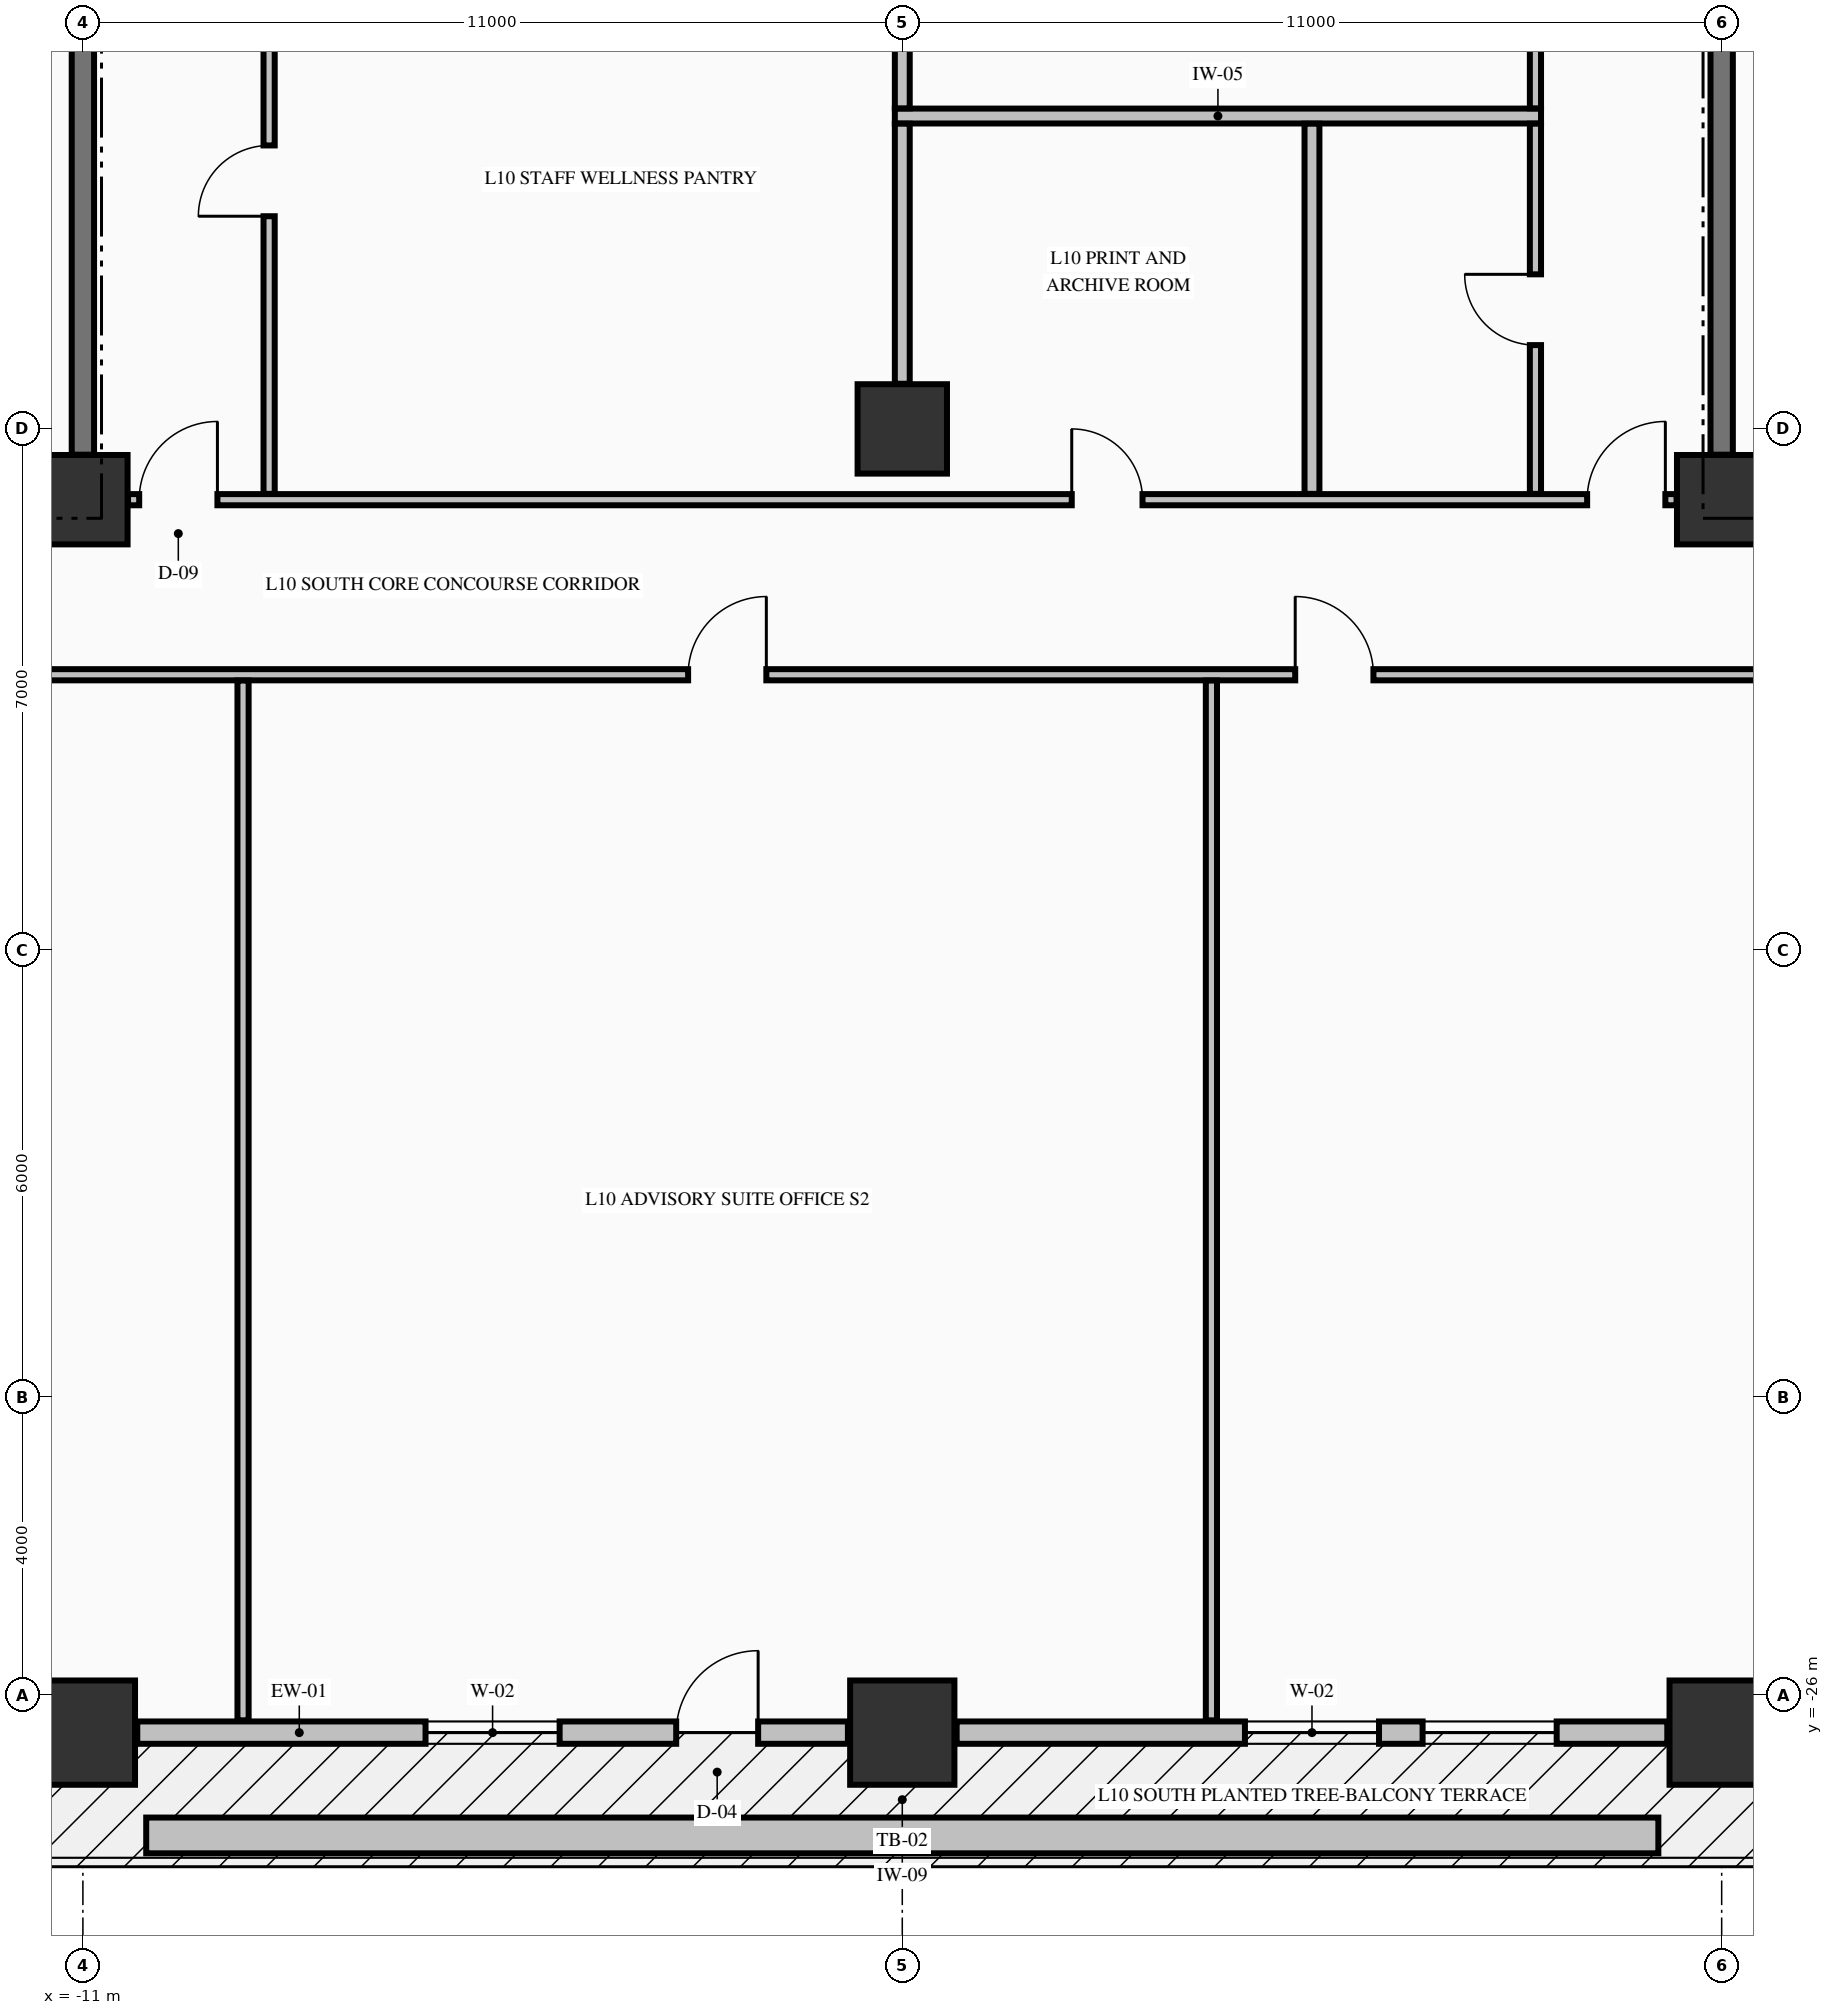
"""IFC4 building model, lengths in metres.
Left out: names, types, materials, properties, quantities, classifications, styles, units other than length and angle.
Written with IfcOpenShell. Run it as: python <this file> out.ifc"""

import sys

from ifc_helpers import new_model, si_unit, direction, frame, frame_2d, origin, origin_2d, place, context, subcontext, project, spatial, rectangle, extrude, element, fill, save


model = new_model("IFC4")
c1 = context("Model", 3, precision=1e-05, world=origin(), true_north=direction((0.0, 1.0)))
c2 = subcontext(c1, "Body", "Model", "MODEL_VIEW")
j1 = project(units=[si_unit("LENGTHUNIT", "METRE"), si_unit("PLANEANGLEUNIT", "RADIAN")], contexts=[c1])
p1 = place(None, origin())
s1 = spatial("IfcSite", under=j1, at=p1, CompositionType="ELEMENT")
p2 = place(p1, origin())
s2 = spatial("IfcBuilding", under=s1, at=p2, CompositionType="ELEMENT")
p3 = place(p2, frame((0.0, 0.0, 45.05)))
s3 = spatial("IfcBuildingStorey", under=s2, at=p3, CompositionType="ELEMENT", Elevation=45.05)
for number, where, z_axis, x_axis in (
    (1, (-11.0, -26.5, -0.25), (0.0, 0.0, 1.0), (1.0, 0.0, 0.0)),
    (2, (0.0, -26.5, -0.25), (0.0, 0.0, 1.0), (1.0, 0.0, 0.0)),
    (3, (11.0, -26.5, -0.25), (0.0, 0.0, 1.0), (1.0, 0.0, 0.0)),
):
    element("IfcColumn", number, at=place(p3, frame(where, z_axis=z_axis, x_axis=x_axis)), inside=s3, PredefinedType="COLUMN", context=c2, shape_type="SweptSolid", body=[
        extrude(rectangle(XDim=1.4, YDim=1.4, at=origin_2d()), origin(), (0.0, 0.0, 1.0), 3.57),
    ])
for number, where, z_axis, x_axis in (
    (4, (-11.0, -9.95, -0.25), (0.0, 0.0, 1.0), (1.0, 0.0, 0.0)),
    (5, (11.0, -9.95, -0.25), (0.0, 0.0, 1.0), (1.0, 0.0, 0.0)),
    (6, (0.0, -9.0, -0.25), (0.0, 0.0, 1.0), (1.0, 0.0, 0.0)),
):
    element("IfcColumn", number, at=place(p3, frame(where, z_axis=z_axis, x_axis=x_axis)), inside=s3, PredefinedType="COLUMN", context=c2, shape_type="SweptSolid", body=[
        extrude(rectangle(XDim=1.2, YDim=1.2, at=origin_2d()), origin(), (0.0, 0.0, 1.0), 3.57),
    ])
p4 = place(p3, frame((-10.27, -26.5, 0.0), z_axis=(0.0, 0.0, 1.0), x_axis=(1.0, 0.0, 0.0)))
e7 = element("IfcWall", 7, at=p4, inside=s3, PredefinedType="STANDARD", context=c2, shape_type="SweptSolid", body=[
    extrude(rectangle(XDim=9.54, YDim=0.3, at=frame_2d((4.77, 0.0))), origin(), (0.0, 0.0, 1.0), 2.712),
])
p5 = place(p4, frame((7.235, 0.0, 0.0)))
e8 = element("IfcOpeningElement", 8, at=p5, cuts=e7, PredefinedType="OPENING", context=c2, shape_type="SweptSolid", body=[
    extrude(rectangle(XDim=1.1, YDim=2.15, at=frame_2d((0.55, 1.075))), frame((0.0, 0.16, 0.0), z_axis=(0.0, -1.0, 0.0), x_axis=(1.0, 0.0, 0.0)), (0.0, 0.0, 1.0), 0.32),
])
p6 = place(p4, frame((3.87, 0.0, 0.78)))
e9 = element("IfcOpeningElement", 9, at=p6, cuts=e7, PredefinedType="OPENING", context=c2, shape_type="SweptSolid", body=[
    extrude(rectangle(XDim=1.8, YDim=1.72, at=frame_2d((0.9, 0.86))), frame((0.0, 0.16, 0.0), z_axis=(0.0, -1.0, 0.0), x_axis=(1.0, 0.0, 0.0)), (0.0, 0.0, 1.0), 0.32),
])
p7 = place(p3, frame((0.73, -26.5, 0.0), z_axis=(0.0, 0.0, 1.0), x_axis=(1.0, 0.0, 0.0)))
e10 = element("IfcWall", 10, at=p7, inside=s3, PredefinedType="STANDARD", context=c2, shape_type="SweptSolid", body=[
    extrude(rectangle(XDim=9.54, YDim=0.3, at=frame_2d((4.77, 0.0))), origin(), (0.0, 0.0, 1.0), 2.712),
])
p8 = place(p7, frame((3.87, 0.0, 0.78)))
e11 = element("IfcOpeningElement", 11, at=p8, cuts=e10, PredefinedType="OPENING", context=c2, shape_type="SweptSolid", body=[
    extrude(rectangle(XDim=1.8, YDim=1.72, at=frame_2d((0.9, 0.86))), frame((0.0, 0.16, 0.0), z_axis=(0.0, -1.0, 0.0), x_axis=(1.0, 0.0, 0.0)), (0.0, 0.0, 1.0), 0.32),
])
p9 = place(p7, frame((6.255, 0.0, 0.78)))
e12 = element("IfcOpeningElement", 12, at=p9, cuts=e10, PredefinedType="OPENING", context=c2, shape_type="SweptSolid", body=[
    extrude(rectangle(XDim=1.8, YDim=1.72, at=frame_2d((0.9, 0.86))), frame((0.0, 0.16, 0.0), z_axis=(0.0, -1.0, 0.0), x_axis=(1.0, 0.0, 0.0)), (0.0, 0.0, 1.0), 0.32),
])
p10 = place(p3, frame((-23.835, -12.3, 0.0), z_axis=(0.0, 0.0, 1.0), x_axis=(1.0, 0.0, 0.0)))
e13 = element("IfcWall", 13, at=p10, inside=s3, PredefinedType="PARTITIONING", context=c2, shape_type="SweptSolid", body=[
    extrude(rectangle(XDim=52.67, YDim=0.15, at=frame_2d((26.335, 0.0))), origin(), (0.0, 0.0, 1.0), 3.32),
])
p11 = place(p10, frame((8.99, 0.0, 0.0)))
e14 = element("IfcOpeningElement", 14, at=p11, cuts=e13, PredefinedType="OPENING", context=c2, shape_type="SweptSolid", body=[
    extrude(rectangle(XDim=1.05, YDim=2.15, at=frame_2d((0.525, 1.075))), frame((0.0, 0.085, 0.0), z_axis=(0.0, -1.0, 0.0), x_axis=(1.0, 0.0, 0.0)), (0.0, 0.0, 1.0), 0.17),
])
p12 = place(p10, frame((20.96, 0.0, 0.0)))
e15 = element("IfcOpeningElement", 15, at=p12, cuts=e13, PredefinedType="OPENING", context=c2, shape_type="SweptSolid", body=[
    extrude(rectangle(XDim=1.05, YDim=2.15, at=frame_2d((0.525, 1.075))), frame((0.0, 0.085, 0.0), z_axis=(0.0, -1.0, 0.0), x_axis=(1.0, 0.0, 0.0)), (0.0, 0.0, 1.0), 0.17),
])
p13 = place(p10, frame((29.11, 0.0, 0.0)))
e16 = element("IfcOpeningElement", 16, at=p13, cuts=e13, PredefinedType="OPENING", context=c2, shape_type="SweptSolid", body=[
    extrude(rectangle(XDim=1.05, YDim=2.15, at=frame_2d((0.525, 1.075))), frame((0.0, 0.085, 0.0), z_axis=(0.0, -1.0, 0.0), x_axis=(1.0, 0.0, 0.0)), (0.0, 0.0, 1.0), 0.17),
])
p14 = place(p3, frame((-10.394, -9.95, 0.0), z_axis=(0.0, 0.0, 1.0), x_axis=(1.0, 0.0, 0.0)))
e17 = element("IfcWall", 17, at=p14, inside=s3, PredefinedType="PARTITIONING", context=c2, shape_type="SweptSolid", body=[
    extrude(rectangle(XDim=20.788, YDim=0.15, at=frame_2d((10.394, 0.0))), origin(), (0.0, 0.0, 1.0), 3.32),
])
p15 = place(p14, frame((0.15, 0.0, 0.0)))
e18 = element("IfcOpeningElement", 18, at=p15, cuts=e17, PredefinedType="OPENING", context=c2, shape_type="SweptSolid", body=[
    extrude(rectangle(XDim=1.05, YDim=2.15, at=frame_2d((0.525, 1.075))), frame((0.0, 0.085, 0.0), z_axis=(0.0, -1.0, 0.0), x_axis=(1.0, 0.0, 0.0)), (0.0, 0.0, 1.0), 0.17),
])
p16 = place(p14, frame((19.588, 0.0, 0.0)))
e19 = element("IfcOpeningElement", 19, at=p16, cuts=e17, PredefinedType="OPENING", context=c2, shape_type="SweptSolid", body=[
    extrude(rectangle(XDim=1.05, YDim=2.15, at=frame_2d((0.525, 1.075))), frame((0.0, 0.085, 0.0), z_axis=(0.0, -1.0, 0.0), x_axis=(1.0, 0.0, 0.0)), (0.0, 0.0, 1.0), 0.17),
])
p17 = place(p14, frame((12.669, 0.0, 0.0)))
e20 = element("IfcOpeningElement", 20, at=p17, cuts=e17, PredefinedType="OPENING", context=c2, shape_type="SweptSolid", body=[
    extrude(rectangle(XDim=0.95, YDim=2.15, at=frame_2d((0.475, 1.075))), frame((0.0, 0.085, 0.0), z_axis=(0.0, -1.0, 0.0), x_axis=(1.0, 0.0, 0.0)), (0.0, 0.0, 1.0), 0.17),
])
p18 = place(p3, frame((-0.1, -4.8, 0.0), z_axis=(0.0, 0.0, 1.0), x_axis=(1.0, 0.0, 0.0)))
e21 = element("IfcWall", 21, at=p18, inside=s3, PredefinedType="PARTITIONING", context=c2, shape_type="SweptSolid", body=[
    extrude(rectangle(XDim=8.675, YDim=0.2, at=frame_2d((4.337, 0.0))), origin(), (0.0, 0.0, 1.0), 3.32),
])
for number, where, z_axis, x_axis in (
    (22, (-11.0, -9.346, 0.0), (0.0, 0.0, 1.0), (0.0, 1.0, 0.0)),
    (23, (11.0, -9.346, 0.0), (0.0, 0.0, 1.0), (0.0, 1.0, 0.0)),
):
    element("IfcWall", number, at=place(p3, frame(where, z_axis=z_axis, x_axis=x_axis)), inside=s3, PredefinedType="SHEAR", context=c2, shape_type="SweptSolid", body=[
        extrude(rectangle(XDim=8.742, YDim=0.3, at=frame_2d((4.371, 0.0))), origin(), (0.0, 0.0, 1.0), 3.32),
    ])
p19 = place(p3, frame((-8.85, -26.335, 0.0), z_axis=(0.0, 0.0, 1.0), x_axis=(0.0, 1.0, 0.0)))
e24 = element("IfcWall", 24, at=p19, inside=s3, PredefinedType="PARTITIONING", context=c2, shape_type="SweptSolid", body=[
    extrude(rectangle(XDim=13.957, YDim=0.15, at=frame_2d((6.979, 0.0))), origin(), (0.0, 0.0, 1.0), 3.32),
])
p20 = place(p3, frame((-8.5, -9.872, 0.0), z_axis=(0.0, 0.0, 1.0), x_axis=(0.0, 1.0, 0.0)))
e25 = element("IfcWall", 25, at=p20, inside=s3, PredefinedType="PARTITIONING", context=c2, shape_type="SweptSolid", body=[
    extrude(rectangle(XDim=8.369, YDim=0.15, at=frame_2d((4.185, 0.0))), origin(), (0.0, 0.0, 1.0), 3.32),
])
p21 = place(p20, frame((3.727, 0.0, 0.0)))
e26 = element("IfcOpeningElement", 26, at=p21, cuts=e25, PredefinedType="OPENING", context=c2, shape_type="SweptSolid", body=[
    extrude(rectangle(XDim=0.95, YDim=2.15, at=frame_2d((0.475, 1.075))), frame((0.0, 0.085, 0.0), z_axis=(0.0, -1.0, 0.0), x_axis=(1.0, 0.0, 0.0)), (0.0, 0.0, 1.0), 0.17),
])
p22 = place(p3, frame((0.0, -8.394, 0.0), z_axis=(0.0, 0.0, 1.0), x_axis=(0.0, 1.0, 0.0)))
e27 = element("IfcWall", 27, at=p22, inside=s3, PredefinedType="PARTITIONING", context=c2, shape_type="SweptSolid", body=[
    extrude(rectangle(XDim=3.491, YDim=0.2, at=frame_2d((1.746, 0.0))), origin(), (0.0, 0.0, 1.0), 2.66),
])
p23 = place(p3, frame((0.0, -4.697, 0.0), z_axis=(0.0, 0.0, 1.0), x_axis=(0.0, 1.0, 0.0)))
e28 = element("IfcWall", 28, at=p23, inside=s3, PredefinedType="PARTITIONING", context=c2, shape_type="SweptSolid", body=[
    extrude(rectangle(XDim=3.194, YDim=0.2, at=frame_2d((1.597, 0.0))), origin(), (0.0, 0.0, 1.0), 2.66),
])
p24 = place(p3, frame((4.15, -26.335, 0.0), z_axis=(0.0, 0.0, 1.0), x_axis=(0.0, 1.0, 0.0)))
e29 = element("IfcWall", 29, at=p24, inside=s3, PredefinedType="PARTITIONING", context=c2, shape_type="SweptSolid", body=[
    extrude(rectangle(XDim=13.957, YDim=0.15, at=frame_2d((6.979, 0.0))), origin(), (0.0, 0.0, 1.0), 3.32),
])
p25 = place(p3, frame((5.5, -9.872, 0.0), z_axis=(0.0, 0.0, 1.0), x_axis=(0.0, 1.0, 0.0)))
e30 = element("IfcWall", 30, at=p25, inside=s3, PredefinedType="PARTITIONING", context=c2, shape_type="SweptSolid", body=[
    extrude(rectangle(XDim=4.969, YDim=0.2, at=frame_2d((2.484, 0.0))), origin(), (0.0, 0.0, 1.0), 3.32),
])
p26 = place(p3, frame((8.5, -9.872, 0.0), z_axis=(0.0, 0.0, 1.0), x_axis=(0.0, 1.0, 0.0)))
e31 = element("IfcWall", 31, at=p26, inside=s3, PredefinedType="PARTITIONING", context=c2, shape_type="SweptSolid", body=[
    extrude(rectangle(XDim=4.969, YDim=0.15, at=frame_2d((2.484, 0.0))), origin(), (0.0, 0.0, 1.0), 3.32),
])
p27 = place(p26, frame((1.997, 0.0, 0.0)))
e32 = element("IfcOpeningElement", 32, at=p27, cuts=e31, PredefinedType="OPENING", context=c2, shape_type="SweptSolid", body=[
    extrude(rectangle(XDim=0.95, YDim=2.15, at=frame_2d((0.475, 1.075))), frame((0.0, 0.085, 0.0), z_axis=(0.0, -1.0, 0.0), x_axis=(1.0, 0.0, 0.0)), (0.0, 0.0, 1.0), 0.17),
])
p28 = place(p3, frame((8.5, -4.697, 0.0), z_axis=(0.0, 0.0, 1.0), x_axis=(0.0, 1.0, 0.0)))
e33 = element("IfcWall", 33, at=p28, inside=s3, PredefinedType="PARTITIONING", context=c2, shape_type="SweptSolid", body=[
    extrude(rectangle(XDim=4.794, YDim=0.15, at=frame_2d((2.397, 0.0))), origin(), (0.0, 0.0, 1.0), 3.32),
])
p29 = place(p28, frame((1.922, 0.0, 0.0)))
e34 = element("IfcOpeningElement", 34, at=p29, cuts=e33, PredefinedType="OPENING", context=c2, shape_type="SweptSolid", body=[
    extrude(rectangle(XDim=0.95, YDim=2.15, at=frame_2d((0.475, 1.075))), frame((0.0, 0.085, 0.0), z_axis=(0.0, -1.0, 0.0), x_axis=(1.0, 0.0, 0.0)), (0.0, 0.0, 1.0), 0.17),
])
p30 = place(p3, frame((-10.15, -27.88, -0.04), z_axis=(0.0, 0.0, 1.0), x_axis=(1.0, 0.0, 0.0)))
e35 = element("IfcWall", 35, at=p30, inside=s3, PredefinedType="PARAPET", context=c2, shape_type="SweptSolid", body=[
    extrude(rectangle(XDim=20.3, YDim=0.48, at=frame_2d((10.15, 0.0))), origin(), (0.0, 0.0, 1.0), 0.52),
])
p31 = place(p5, origin())
e36 = element("IfcDoor", 36, at=p31, inside=s3, OperationType="SINGLE_SWING_RIGHT", PredefinedType="DOOR", context=c2, shape_type="SweptSolid", body=[
    extrude(rectangle(XDim=1.1, YDim=2.15, at=frame_2d((0.55, 1.075))), frame((0.0, 0.025, 0.0), z_axis=(0.0, -1.0, 0.0), x_axis=(1.0, 0.0, 0.0)), (0.0, 0.0, 1.0), 0.05),
])
fill(e8, e36)
p32 = place(p6, origin())
e37 = element("IfcWindow", 37, at=p32, inside=s3, PartitioningType="SINGLE_PANEL", PredefinedType="WINDOW", context=c2, shape_type="SweptSolid", body=[
    extrude(rectangle(XDim=1.8, YDim=1.72, at=frame_2d((0.9, 0.86))), frame((0.0, 0.03, 0.0), z_axis=(0.0, -1.0, 0.0), x_axis=(1.0, 0.0, 0.0)), (0.0, 0.0, 1.0), 0.06),
])
fill(e9, e37)
p33 = place(p8, origin())
e38 = element("IfcWindow", 38, at=p33, inside=s3, PartitioningType="SINGLE_PANEL", PredefinedType="WINDOW", context=c2, shape_type="SweptSolid", body=[
    extrude(rectangle(XDim=1.8, YDim=1.72, at=frame_2d((0.9, 0.86))), frame((0.0, 0.03, 0.0), z_axis=(0.0, -1.0, 0.0), x_axis=(1.0, 0.0, 0.0)), (0.0, 0.0, 1.0), 0.06),
])
fill(e11, e38)
p34 = place(p9, origin())
e39 = element("IfcWindow", 39, at=p34, inside=s3, PartitioningType="SINGLE_PANEL", PredefinedType="WINDOW", context=c2, shape_type="SweptSolid", body=[
    extrude(rectangle(XDim=1.8, YDim=1.72, at=frame_2d((0.9, 0.86))), frame((0.0, 0.03, 0.0), z_axis=(0.0, -1.0, 0.0), x_axis=(1.0, 0.0, 0.0)), (0.0, 0.0, 1.0), 0.06),
])
fill(e12, e39)
p35 = place(p15, origin())
e40 = element("IfcDoor", 40, at=p35, inside=s3, OperationType="SINGLE_SWING_RIGHT", PredefinedType="DOOR", context=c2, shape_type="SweptSolid", body=[
    extrude(rectangle(XDim=1.05, YDim=2.15, at=frame_2d((0.525, 1.075))), frame((0.0, 0.025, 0.0), z_axis=(0.0, -1.0, 0.0), x_axis=(1.0, 0.0, 0.0)), (0.0, 0.0, 1.0), 0.05),
])
fill(e18, e40)
p36 = place(p16, origin())
e41 = element("IfcDoor", 41, at=p36, inside=s3, OperationType="SINGLE_SWING_RIGHT", PredefinedType="DOOR", context=c2, shape_type="SweptSolid", body=[
    extrude(rectangle(XDim=1.05, YDim=2.15, at=frame_2d((0.525, 1.075))), frame((0.0, 0.025, 0.0), z_axis=(0.0, -1.0, 0.0), x_axis=(1.0, 0.0, 0.0)), (0.0, 0.0, 1.0), 0.05),
])
fill(e19, e41)
p37 = place(p12, origin())
e42 = element("IfcDoor", 42, at=p37, inside=s3, OperationType="SINGLE_SWING_RIGHT", PredefinedType="DOOR", context=c2, shape_type="SweptSolid", body=[
    extrude(rectangle(XDim=1.05, YDim=2.15, at=frame_2d((0.525, 1.075))), frame((0.0, 0.025, 0.0), z_axis=(0.0, -1.0, 0.0), x_axis=(1.0, 0.0, 0.0)), (0.0, 0.0, 1.0), 0.05),
])
fill(e15, e42)
p38 = place(p13, origin())
e43 = element("IfcDoor", 43, at=p38, inside=s3, OperationType="SINGLE_SWING_LEFT", PredefinedType="DOOR", context=c2, shape_type="SweptSolid", body=[
    extrude(rectangle(XDim=1.05, YDim=2.15, at=frame_2d((0.525, 1.075))), frame((0.0, 0.025, 0.0), z_axis=(0.0, -1.0, 0.0), x_axis=(1.0, 0.0, 0.0)), (0.0, 0.0, 1.0), 0.05),
])
fill(e16, e43)
p39 = place(p21, origin())
e44 = element("IfcDoor", 44, at=p39, inside=s3, OperationType="SINGLE_SWING_LEFT", PredefinedType="DOOR", context=c2, shape_type="SweptSolid", body=[
    extrude(rectangle(XDim=0.95, YDim=2.15, at=frame_2d((0.475, 1.075))), frame((0.0, 0.025, 0.0), z_axis=(0.0, -1.0, 0.0), x_axis=(1.0, 0.0, 0.0)), (0.0, 0.0, 1.0), 0.05),
])
fill(e26, e44)
p40 = place(p27, origin())
e45 = element("IfcDoor", 45, at=p40, inside=s3, OperationType="SINGLE_SWING_RIGHT", PredefinedType="DOOR", context=c2, shape_type="SweptSolid", body=[
    extrude(rectangle(XDim=0.95, YDim=2.15, at=frame_2d((0.475, 1.075))), frame((0.0, 0.025, 0.0), z_axis=(0.0, -1.0, 0.0), x_axis=(1.0, 0.0, 0.0)), (0.0, 0.0, 1.0), 0.05),
])
fill(e32, e45)
p41 = place(p17, origin())
e46 = element("IfcDoor", 46, at=p41, inside=s3, OperationType="SINGLE_SWING_LEFT", PredefinedType="DOOR", context=c2, shape_type="SweptSolid", body=[
    extrude(rectangle(XDim=0.95, YDim=2.15, at=frame_2d((0.475, 1.075))), frame((0.0, 0.025, 0.0), z_axis=(0.0, -1.0, 0.0), x_axis=(1.0, 0.0, 0.0)), (0.0, 0.0, 1.0), 0.05),
])
fill(e20, e46)
save(model, sys.argv[1])
